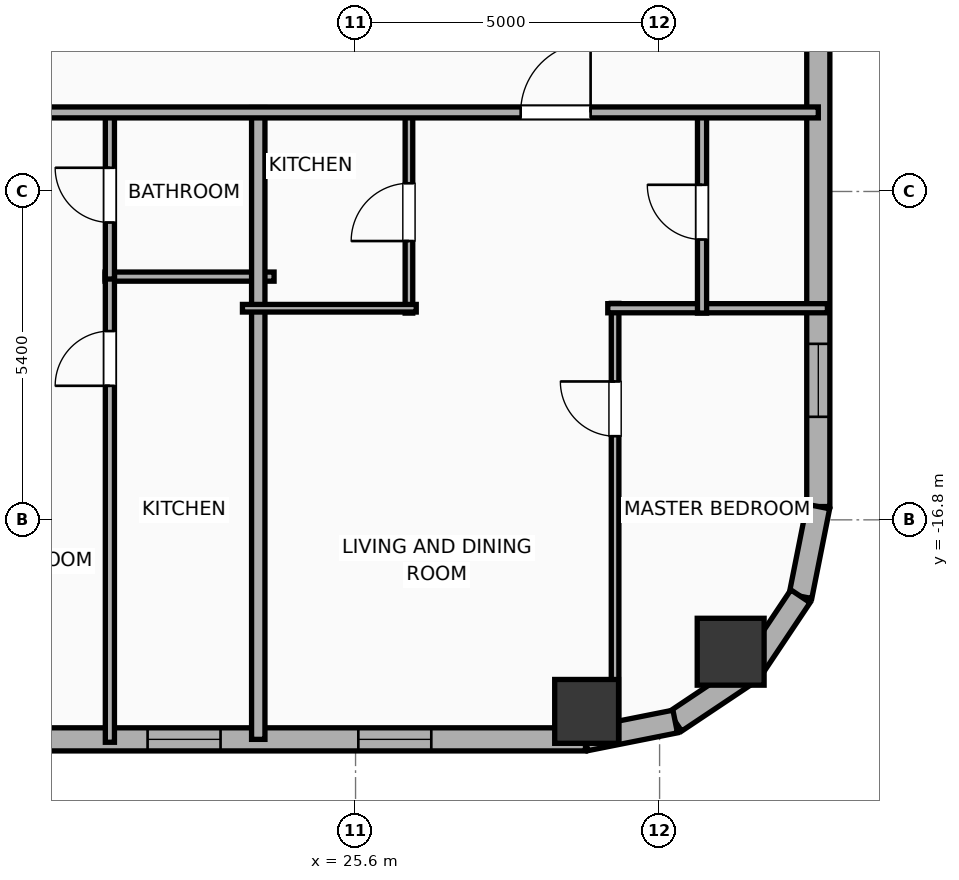
"""IFC4 building model, lengths in metres.
Left out: names, types, materials, properties, quantities, classifications, styles, units other than length and angle.
Written with IfcOpenShell. Run it as: python <this file> out.ifc"""

import sys

from ifc_helpers import new_model, si_unit, direction, frame, frame_2d, origin, origin_2d, place, context, subcontext, project, spatial, rectangle, hollow_rectangle, hollow_circle, extrude, element, fill, save


model = new_model("IFC4")
c1 = context("Model", 3, precision=1e-05, world=origin(), true_north=direction((0.0, 1.0)))
c2 = subcontext(c1, "Body", "Model", "MODEL_VIEW")
j1 = project(units=[si_unit("LENGTHUNIT", "METRE"), si_unit("PLANEANGLEUNIT", "RADIAN")], contexts=[c1])
p1 = place(None, origin())
s1 = spatial("IfcSite", under=j1, at=p1, CompositionType="ELEMENT")
p2 = place(p1, origin())
s2 = spatial("IfcBuilding", under=s1, at=p2, CompositionType="ELEMENT")
p3 = place(p2, frame((0.0, 0.0, 128.7)))
s3 = spatial("IfcBuildingStorey", under=s2, at=p3, CompositionType="ELEMENT", Elevation=128.7)
p4 = place(p3, frame((29.4, -19.95, 0.0), z_axis=(0.0, 0.0, 1.0), x_axis=(1.0, 0.0, 0.0)))
e1 = element("IfcColumn", 1, at=p4, inside=s3, PredefinedType="COLUMN", context=c2, shape_type="SweptSolid", body=[
    extrude(hollow_rectangle(XDim=1.05, YDim=1.05, WallThickness=0.036, at=origin_2d()), origin(), (0.0, 0.0, 1.0), 3.9),
])
p5 = place(p3, frame((31.769, -18.969, 0.0), z_axis=(0.0, 0.0, 1.0), x_axis=(1.0, 0.0, 0.0)))
e2 = element("IfcColumn", 2, at=p5, inside=s3, PredefinedType="COLUMN", context=c2, shape_type="SweptSolid", body=[
    extrude(hollow_circle(Radius=0.55, WallThickness=0.036, at=origin_2d()), origin(), (0.0, 0.0, 1.0), 3.9),
])
p6 = place(p3, frame((29.381, -20.41, 0.0), z_axis=(0.0, 0.0, 1.0), x_axis=(-1.0, 0.0, 0.0)))
e3 = element("IfcWall", 3, at=p6, inside=s3, PredefinedType="ELEMENTEDWALL", context=c2, shape_type="SweptSolid", body=[
    extrude(rectangle(XDim=54.763, YDim=0.38, at=frame_2d((27.381, 0.0))), origin(), (0.0, 0.0, 1.0), 3.65),
])
p7 = place(p6, frame((45.067, 0.0, 0.75)))
e4 = element("IfcOpeningElement", 4, at=p7, cuts=e3, PredefinedType="OPENING", context=c2, shape_type="SweptSolid", body=[
    extrude(rectangle(XDim=2.4, YDim=2.1, at=frame_2d((1.2, 1.05))), frame((0.0, 0.2, 0.0), z_axis=(0.0, -1.0, 0.0), x_axis=(1.0, 0.0, 0.0)), (0.0, 0.0, 1.0), 0.4),
])
p8 = place(p6, frame((51.777, 0.0, 0.75)))
e5 = element("IfcOpeningElement", 5, at=p8, cuts=e3, PredefinedType="OPENING", context=c2, shape_type="SweptSolid", body=[
    extrude(rectangle(XDim=1.2, YDim=2.05, at=frame_2d((0.6, 1.025))), frame((0.0, 0.2, 0.0), z_axis=(0.0, -1.0, 0.0), x_axis=(1.0, 0.0, 0.0)), (0.0, 0.0, 1.0), 0.4),
])
p9 = place(p6, frame((48.976, 0.0, 0.75)))
e6 = element("IfcOpeningElement", 6, at=p9, cuts=e3, PredefinedType="OPENING", context=c2, shape_type="SweptSolid", body=[
    extrude(rectangle(XDim=1.2, YDim=2.05, at=frame_2d((0.6, 1.025))), frame((0.0, 0.2, 0.0), z_axis=(0.0, -1.0, 0.0), x_axis=(1.0, 0.0, 0.0)), (0.0, 0.0, 1.0), 0.4),
])
p10 = place(p6, frame((40.531, 0.0, 0.75)))
e7 = element("IfcOpeningElement", 7, at=p10, cuts=e3, PredefinedType="OPENING", context=c2, shape_type="SweptSolid", body=[
    extrude(rectangle(XDim=1.2, YDim=2.05, at=frame_2d((0.6, 1.025))), frame((0.0, 0.2, 0.0), z_axis=(0.0, -1.0, 0.0), x_axis=(1.0, 0.0, 0.0)), (0.0, 0.0, 1.0), 0.4),
])
p11 = place(p6, frame((33.686, 0.0, 0.75)))
e8 = element("IfcOpeningElement", 8, at=p11, cuts=e3, PredefinedType="OPENING", context=c2, shape_type="SweptSolid", body=[
    extrude(rectangle(XDim=1.2, YDim=2.05, at=frame_2d((0.6, 1.025))), frame((0.0, 0.2, 0.0), z_axis=(0.0, -1.0, 0.0), x_axis=(1.0, 0.0, 0.0)), (0.0, 0.0, 1.0), 0.4),
])
p12 = place(p6, frame((35.976, 0.0, 0.75)))
e9 = element("IfcOpeningElement", 9, at=p12, cuts=e3, PredefinedType="OPENING", context=c2, shape_type="SweptSolid", body=[
    extrude(rectangle(XDim=1.2, YDim=2.05, at=frame_2d((0.6, 1.025))), frame((0.0, 0.2, 0.0), z_axis=(0.0, -1.0, 0.0), x_axis=(1.0, 0.0, 0.0)), (0.0, 0.0, 1.0), 0.4),
])
p13 = place(p6, frame((28.805, 0.0, 0.75)))
e10 = element("IfcOpeningElement", 10, at=p13, cuts=e3, PredefinedType="OPENING", context=c2, shape_type="SweptSolid", body=[
    extrude(rectangle(XDim=1.2, YDim=2.05, at=frame_2d((0.6, 1.025))), frame((0.0, 0.2, 0.0), z_axis=(0.0, -1.0, 0.0), x_axis=(1.0, 0.0, 0.0)), (0.0, 0.0, 1.0), 0.4),
])
p14 = place(p6, frame((25.555, 0.0, 0.75)))
e11 = element("IfcOpeningElement", 11, at=p14, cuts=e3, PredefinedType="OPENING", context=c2, shape_type="SweptSolid", body=[
    extrude(rectangle(XDim=1.2, YDim=2.05, at=frame_2d((0.6, 1.025))), frame((0.0, 0.2, 0.0), z_axis=(0.0, -1.0, 0.0), x_axis=(1.0, 0.0, 0.0)), (0.0, 0.0, 1.0), 0.4),
])
p15 = place(p6, frame((19.951, 0.0, 0.75)))
e12 = element("IfcOpeningElement", 12, at=p15, cuts=e3, PredefinedType="OPENING", context=c2, shape_type="SweptSolid", body=[
    extrude(rectangle(XDim=1.2, YDim=2.05, at=frame_2d((0.6, 1.025))), frame((0.0, 0.2, 0.0), z_axis=(0.0, -1.0, 0.0), x_axis=(1.0, 0.0, 0.0)), (0.0, 0.0, 1.0), 0.4),
])
p16 = place(p6, frame((15.836, 0.0, 0.75)))
e13 = element("IfcOpeningElement", 13, at=p16, cuts=e3, PredefinedType="OPENING", context=c2, shape_type="SweptSolid", body=[
    extrude(rectangle(XDim=1.2, YDim=2.05, at=frame_2d((0.6, 1.025))), frame((0.0, 0.2, 0.0), z_axis=(0.0, -1.0, 0.0), x_axis=(1.0, 0.0, 0.0)), (0.0, 0.0, 1.0), 0.4),
])
p17 = place(p6, frame((12.586, 0.0, 0.75)))
e14 = element("IfcOpeningElement", 14, at=p17, cuts=e3, PredefinedType="OPENING", context=c2, shape_type="SweptSolid", body=[
    extrude(rectangle(XDim=1.2, YDim=2.05, at=frame_2d((0.6, 1.025))), frame((0.0, 0.2, 0.0), z_axis=(0.0, -1.0, 0.0), x_axis=(1.0, 0.0, 0.0)), (0.0, 0.0, 1.0), 0.4),
])
p18 = place(p6, frame((9.011, 0.0, 0.75)))
e15 = element("IfcOpeningElement", 15, at=p18, cuts=e3, PredefinedType="OPENING", context=c2, shape_type="SweptSolid", body=[
    extrude(rectangle(XDim=1.2, YDim=2.05, at=frame_2d((0.6, 1.025))), frame((0.0, 0.2, 0.0), z_axis=(0.0, -1.0, 0.0), x_axis=(1.0, 0.0, 0.0)), (0.0, 0.0, 1.0), 0.4),
])
p19 = place(p6, frame((6.001, 0.0, 0.75)))
e16 = element("IfcOpeningElement", 16, at=p19, cuts=e3, PredefinedType="OPENING", context=c2, shape_type="SweptSolid", body=[
    extrude(rectangle(XDim=1.2, YDim=2.05, at=frame_2d((0.6, 1.025))), frame((0.0, 0.2, 0.0), z_axis=(0.0, -1.0, 0.0), x_axis=(1.0, 0.0, 0.0)), (0.0, 0.0, 1.0), 0.4),
])
p20 = place(p6, frame((2.536, 0.0, 0.75)))
e17 = element("IfcOpeningElement", 17, at=p20, cuts=e3, PredefinedType="OPENING", context=c2, shape_type="SweptSolid", body=[
    extrude(rectangle(XDim=1.2, YDim=2.05, at=frame_2d((0.6, 1.025))), frame((0.0, 0.2, 0.0), z_axis=(0.0, -1.0, 0.0), x_axis=(1.0, 0.0, 0.0)), (0.0, 0.0, 1.0), 0.4),
])
p21 = place(p3, frame((33.21, 17.781, 0.0), z_axis=(0.0, 0.0, 1.0), x_axis=(0.0, -1.0, 0.0)))
e18 = element("IfcWall", 18, at=p21, inside=s3, PredefinedType="ELEMENTEDWALL", context=c2, shape_type="SweptSolid", body=[
    extrude(rectangle(XDim=34.363, YDim=0.38, at=frame_2d((17.181, 0.0))), origin(), (0.0, 0.0, 1.0), 3.65),
])
p22 = place(p21, frame((31.687, 0.0, 0.75)))
e19 = element("IfcOpeningElement", 19, at=p22, cuts=e18, PredefinedType="OPENING", context=c2, shape_type="SweptSolid", body=[
    extrude(rectangle(XDim=1.2, YDim=2.05, at=frame_2d((0.6, 1.025))), frame((0.0, 0.2, 0.0), z_axis=(0.0, -1.0, 0.0), x_axis=(1.0, 0.0, 0.0)), (0.0, 0.0, 1.0), 0.4),
])
p23 = place(p21, frame((12.836, 0.0, 0.75)))
e20 = element("IfcOpeningElement", 20, at=p23, cuts=e18, PredefinedType="OPENING", context=c2, shape_type="SweptSolid", body=[
    extrude(rectangle(XDim=1.2, YDim=2.05, at=frame_2d((0.6, 1.025))), frame((0.0, 0.2, 0.0), z_axis=(0.0, -1.0, 0.0), x_axis=(1.0, 0.0, 0.0)), (0.0, 0.0, 1.0), 0.4),
])
p24 = place(p21, frame((21.386, 0.0, 0.75)))
e21 = element("IfcOpeningElement", 21, at=p24, cuts=e18, PredefinedType="OPENING", context=c2, shape_type="SweptSolid", body=[
    extrude(rectangle(XDim=1.2, YDim=2.05, at=frame_2d((0.6, 1.025))), frame((0.0, 0.2, 0.0), z_axis=(0.0, -1.0, 0.0), x_axis=(1.0, 0.0, 0.0)), (0.0, 0.0, 1.0), 0.4),
])
p25 = place(p3, frame((33.21, -16.581, 0.0), z_axis=(0.0, 0.0, 1.0), x_axis=(-0.195086038585, -0.980786132421, 0.0)))
e22 = element("IfcWall", 22, at=p25, inside=s3, PredefinedType="ELEMENTEDWALL", context=c2, shape_type="SweptSolid", body=[
    extrude(rectangle(XDim=1.504, YDim=0.38, at=frame_2d((0.752, 0.0))), origin(), (0.0, 0.0, 1.0), 3.65),
])
p26 = place(p3, frame((32.917, -18.057, 0.0), z_axis=(0.0, 0.0, 1.0), x_axis=(-0.555610286119, -0.831442848281, 0.0)))
e23 = element("IfcWall", 23, at=p26, inside=s3, PredefinedType="ELEMENTEDWALL", context=c2, shape_type="SweptSolid", body=[
    extrude(rectangle(XDim=1.485, YDim=0.38, at=frame_2d((0.743, 0.0))), origin(), (0.0, 0.0, 1.0), 3.65),
])
p27 = place(p3, frame((32.091, -19.292, 0.0), z_axis=(0.0, 0.0, 1.0), x_axis=(-0.831468045563, -0.555572577804, 0.0)))
e24 = element("IfcWall", 24, at=p27, inside=s3, PredefinedType="ELEMENTEDWALL", context=c2, shape_type="SweptSolid", body=[
    extrude(rectangle(XDim=1.485, YDim=0.38, at=frame_2d((0.742, 0.0))), origin(), (0.0, 0.0, 1.0), 3.65),
])
p28 = place(p3, frame((30.857, -20.116, 0.0), z_axis=(0.0, 0.0, 1.0), x_axis=(-0.980786132421, -0.195086038585, 0.0)))
e25 = element("IfcWall", 25, at=p28, inside=s3, PredefinedType="ELEMENTEDWALL", context=c2, shape_type="SweptSolid", body=[
    extrude(rectangle(XDim=1.504, YDim=0.38, at=frame_2d((0.752, 0.0))), origin(), (0.0, 0.0, 1.0), 3.65),
])
p29 = place(p3, frame((21.48, -12.8, 0.0), z_axis=(0.0, 0.0, 1.0), x_axis=(1.0, 0.0, 0.0)))
e26 = element("IfcWall", 26, at=p29, inside=s3, PredefinedType="PLUMBINGWALL", context=c2, shape_type="SweptSolid", body=[
    extrude(rectangle(XDim=2.78, YDim=0.15, at=frame_2d((1.39, 0.0))), origin(), (0.0, 0.0, 1.0), 3.65),
])
p30 = place(p3, frame((21.56, -20.458, 0.0), z_axis=(0.0, 0.0, 1.0), x_axis=(0.0, 1.0, 0.0)))
e27 = element("IfcWall", 27, at=p30, inside=s3, PredefinedType="PLUMBINGWALL", context=c2, shape_type="SweptSolid", body=[
    extrude(rectangle(XDim=7.698, YDim=0.15, at=frame_2d((3.849, 0.0))), origin(), (0.0, 0.0, 1.0), 3.65),
])
p31 = place(p30, frame((5.862, 0.0, 0.0)))
e28 = element("IfcOpeningElement", 28, at=p31, cuts=e27, PredefinedType="OPENING", context=c2, shape_type="SweptSolid", body=[
    extrude(rectangle(XDim=0.9, YDim=2.05, at=frame_2d((0.45, 1.025))), frame((0.0, 0.085, 0.0), z_axis=(0.0, -1.0, 0.0), x_axis=(1.0, 0.0, 0.0)), (0.0, 0.0, 1.0), 0.17),
])
p32 = place(p3, frame((21.56, -12.84, 0.0), z_axis=(0.0, 0.0, 1.0), x_axis=(0.0, 1.0, 0.0)))
e29 = element("IfcWall", 29, at=p32, inside=s3, PredefinedType="PLUMBINGWALL", context=c2, shape_type="SweptSolid", body=[
    extrude(rectangle(XDim=2.76, YDim=0.15, at=frame_2d((1.38, 0.0))), origin(), (0.0, 0.0, 1.0), 3.65),
])
p33 = place(p32, frame((0.93, 0.0, 0.0)))
e30 = element("IfcOpeningElement", 30, at=p33, cuts=e29, PredefinedType="OPENING", context=c2, shape_type="SweptSolid", body=[
    extrude(rectangle(XDim=0.9, YDim=2.05, at=frame_2d((0.45, 1.025))), frame((0.0, 0.085, 0.0), z_axis=(0.0, -1.0, 0.0), x_axis=(1.0, 0.0, 0.0)), (0.0, 0.0, 1.0), 0.17),
])
p34 = place(p3, frame((24.0, -20.41, 0.0), z_axis=(0.0, 0.0, 1.0), x_axis=(0.0, 1.0, 0.0)))
e31 = element("IfcWall", 31, at=p34, inside=s3, PredefinedType="PARTITIONING", context=c2, shape_type="SweptSolid", body=[
    extrude(rectangle(XDim=10.39, YDim=0.22, at=frame_2d((5.195, 0.0))), origin(), (0.0, 0.0, 1.0), 3.65),
])
p35 = place(p3, frame((29.868, -20.466, 0.0), z_axis=(0.0, 0.0, 1.0), x_axis=(0.0, 1.0, 0.0)))
e32 = element("IfcWall", 32, at=p35, inside=s3, PredefinedType="PARTITIONING", context=c2, shape_type="SweptSolid", body=[
    extrude(rectangle(XDim=7.226, YDim=0.125, at=frame_2d((3.613, 0.0))), origin(), (0.0, 0.0, 1.0), 3.65),
])
p36 = place(p35, frame((5.042, 0.0, 0.0)))
e33 = element("IfcOpeningElement", 33, at=p36, cuts=e32, PredefinedType="OPENING", context=c2, shape_type="SweptSolid", body=[
    extrude(rectangle(XDim=0.9, YDim=2.05, at=frame_2d((0.45, 1.025))), frame((0.0, 0.073, 0.0), z_axis=(0.0, -1.0, 0.0), x_axis=(1.0, 0.0, 0.0)), (0.0, 0.0, 1.0), 0.145),
])
p37 = place(p3, frame((29.748, -13.32, 0.0), z_axis=(0.0, 0.0, 1.0), x_axis=(1.0, 0.0, 0.0)))
e34 = element("IfcWall", 34, at=p37, inside=s3, PredefinedType="PLUMBINGWALL", context=c2, shape_type="SweptSolid", body=[
    extrude(rectangle(XDim=3.612, YDim=0.15, at=frame_2d((1.806, 0.0))), origin(), (0.0, 0.0, 1.0), 3.65),
])
p38 = place(p3, frame((26.478, -13.4, 0.0), z_axis=(0.0, 0.0, 1.0), x_axis=(0.0, 1.0, 0.0)))
e35 = element("IfcWall", 35, at=p38, inside=s3, PredefinedType="PARTITIONING", context=c2, shape_type="SweptSolid", body=[
    extrude(rectangle(XDim=3.32, YDim=0.125, at=frame_2d((1.66, 0.0))), origin(), (0.0, 0.0, 1.0), 3.65),
])
p39 = place(p38, frame((1.185, 0.0, 0.0)))
e36 = element("IfcOpeningElement", 36, at=p39, cuts=e35, PredefinedType="OPENING", context=c2, shape_type="SweptSolid", body=[
    extrude(rectangle(XDim=0.95, YDim=2.05, at=frame_2d((0.475, 1.025))), frame((0.0, 0.073, 0.0), z_axis=(0.0, -1.0, 0.0), x_axis=(1.0, 0.0, 0.0)), (0.0, 0.0, 1.0), 0.145),
])
p40 = place(p3, frame((23.74, -13.32, 0.0), z_axis=(0.0, 0.0, 1.0), x_axis=(1.0, 0.0, 0.0)))
e37 = element("IfcWall", 37, at=p40, inside=s3, PredefinedType="PARTITIONING", context=c2, shape_type="SweptSolid", body=[
    extrude(rectangle(XDim=2.858, YDim=0.125, at=frame_2d((1.429, 0.0))), origin(), (0.0, 0.0, 1.0), 3.65),
])
p41 = place(p3, frame((31.298, -13.4, 0.0), z_axis=(0.0, 0.0, 1.0), x_axis=(0.0, 1.0, 0.0)))
e38 = element("IfcWall", 38, at=p41, inside=s3, PredefinedType="PLUMBINGWALL", context=c2, shape_type="SweptSolid", body=[
    extrude(rectangle(XDim=3.32, YDim=0.15, at=frame_2d((1.66, 0.0))), origin(), (0.0, 0.0, 1.0), 3.65),
])
p42 = place(p41, frame((1.21, 0.0, 0.0)))
e39 = element("IfcOpeningElement", 39, at=p42, cuts=e38, PredefinedType="OPENING", context=c2, shape_type="SweptSolid", body=[
    extrude(rectangle(XDim=0.9, YDim=2.05, at=frame_2d((0.45, 1.025))), frame((0.0, 0.085, 0.0), z_axis=(0.0, -1.0, 0.0), x_axis=(1.0, 0.0, 0.0)), (0.0, 0.0, 1.0), 0.17),
])
p43 = place(p3, frame((-29.21, -10.1, 0.0), z_axis=(0.0, 0.0, 1.0), x_axis=(1.0, 0.0, 0.0)))
e40 = element("IfcWall", 40, at=p43, inside=s3, PredefinedType="PARTITIONING", context=c2, shape_type="SweptSolid", body=[
    extrude(rectangle(XDim=62.42, YDim=0.18, at=frame_2d((31.21, 0.0))), origin(), (0.0, 0.0, 1.0), 3.65),
])
p44 = place(p43, frame((3.414, 0.0, 0.0)))
e41 = element("IfcOpeningElement", 41, at=p44, cuts=e40, PredefinedType="OPENING", context=c2, shape_type="SweptSolid", body=[
    extrude(rectangle(XDim=1.15, YDim=2.05, at=frame_2d((0.575, 1.025))), frame((0.0, 0.1, 0.0), z_axis=(0.0, -1.0, 0.0), x_axis=(1.0, 0.0, 0.0)), (0.0, 0.0, 1.0), 0.2),
])
p45 = place(p43, frame((11.659, 0.0, 0.0)))
e42 = element("IfcOpeningElement", 42, at=p45, cuts=e40, PredefinedType="OPENING", context=c2, shape_type="SweptSolid", body=[
    extrude(rectangle(XDim=1.15, YDim=2.05, at=frame_2d((0.575, 1.025))), frame((0.0, 0.1, 0.0), z_axis=(0.0, -1.0, 0.0), x_axis=(1.0, 0.0, 0.0)), (0.0, 0.0, 1.0), 0.2),
])
p46 = place(p43, frame((17.14, 0.0, 0.0)))
e43 = element("IfcOpeningElement", 43, at=p46, cuts=e40, PredefinedType="OPENING", context=c2, shape_type="SweptSolid", body=[
    extrude(rectangle(XDim=0.9, YDim=2.05, at=frame_2d((0.45, 1.025))), frame((0.0, 0.1, 0.0), z_axis=(0.0, -1.0, 0.0), x_axis=(1.0, 0.0, 0.0)), (0.0, 0.0, 1.0), 0.2),
])
p47 = place(p43, frame((24.661, 0.0, 0.0)))
e44 = element("IfcOpeningElement", 44, at=p47, cuts=e40, PredefinedType="OPENING", context=c2, shape_type="SweptSolid", body=[
    extrude(rectangle(XDim=1.15, YDim=2.05, at=frame_2d((0.575, 1.025))), frame((0.0, 0.1, 0.0), z_axis=(0.0, -1.0, 0.0), x_axis=(1.0, 0.0, 0.0)), (0.0, 0.0, 1.0), 0.2),
])
p48 = place(p43, frame((28.644, 0.0, 0.0)))
e45 = element("IfcOpeningElement", 45, at=p48, cuts=e40, PredefinedType="OPENING", context=c2, shape_type="SweptSolid", body=[
    extrude(rectangle(XDim=1.15, YDim=2.05, at=frame_2d((0.575, 1.025))), frame((0.0, 0.1, 0.0), z_axis=(0.0, -1.0, 0.0), x_axis=(1.0, 0.0, 0.0)), (0.0, 0.0, 1.0), 0.2),
])
p49 = place(p43, frame((36.64, 0.0, 0.0)))
e46 = element("IfcOpeningElement", 46, at=p49, cuts=e40, PredefinedType="OPENING", context=c2, shape_type="SweptSolid", body=[
    extrude(rectangle(XDim=0.9, YDim=2.05, at=frame_2d((0.45, 1.025))), frame((0.0, 0.1, 0.0), z_axis=(0.0, -1.0, 0.0), x_axis=(1.0, 0.0, 0.0)), (0.0, 0.0, 1.0), 0.2),
])
p50 = place(p43, frame((41.608, 0.0, 0.0)))
e47 = element("IfcOpeningElement", 47, at=p50, cuts=e40, PredefinedType="OPENING", context=c2, shape_type="SweptSolid", body=[
    extrude(rectangle(XDim=1.15, YDim=2.05, at=frame_2d((0.575, 1.025))), frame((0.0, 0.1, 0.0), z_axis=(0.0, -1.0, 0.0), x_axis=(1.0, 0.0, 0.0)), (0.0, 0.0, 1.0), 0.2),
])
p51 = place(p43, frame((48.194, 0.0, 0.0)))
e48 = element("IfcOpeningElement", 48, at=p51, cuts=e40, PredefinedType="OPENING", context=c2, shape_type="SweptSolid", body=[
    extrude(rectangle(XDim=1.15, YDim=2.05, at=frame_2d((0.575, 1.025))), frame((0.0, 0.1, 0.0), z_axis=(0.0, -1.0, 0.0), x_axis=(1.0, 0.0, 0.0)), (0.0, 0.0, 1.0), 0.2),
])
p52 = place(p43, frame((57.525, 0.0, 0.0)))
e49 = element("IfcOpeningElement", 49, at=p52, cuts=e40, PredefinedType="OPENING", context=c2, shape_type="SweptSolid", body=[
    extrude(rectangle(XDim=1.15, YDim=2.05, at=frame_2d((0.575, 1.025))), frame((0.0, 0.1, 0.0), z_axis=(0.0, -1.0, 0.0), x_axis=(1.0, 0.0, 0.0)), (0.0, 0.0, 1.0), 0.2),
])
p53 = place(p19, origin())
e50 = element("IfcWindow", 50, at=p53, inside=s3, PartitioningType="SINGLE_PANEL", PredefinedType="WINDOW", context=c2, shape_type="SweptSolid", body=[
    extrude(rectangle(XDim=1.2, YDim=2.05, at=frame_2d((0.6, 1.025))), frame((0.0, 0.03, 0.0), z_axis=(0.0, -1.0, 0.0), x_axis=(1.0, 0.0, 0.0)), (0.0, 0.0, 1.0), 0.06),
])
fill(e16, e50)
p54 = place(p20, origin())
e51 = element("IfcWindow", 51, at=p54, inside=s3, PartitioningType="SINGLE_PANEL", PredefinedType="WINDOW", context=c2, shape_type="SweptSolid", body=[
    extrude(rectangle(XDim=1.2, YDim=2.05, at=frame_2d((0.6, 1.025))), frame((0.0, 0.03, 0.0), z_axis=(0.0, -1.0, 0.0), x_axis=(1.0, 0.0, 0.0)), (0.0, 0.0, 1.0), 0.06),
])
fill(e17, e51)
p55 = place(p22, origin())
e52 = element("IfcWindow", 52, at=p55, inside=s3, PartitioningType="SINGLE_PANEL", PredefinedType="WINDOW", context=c2, shape_type="SweptSolid", body=[
    extrude(rectangle(XDim=1.2, YDim=2.05, at=frame_2d((0.6, 1.025))), frame((0.0, 0.03, 0.0), z_axis=(0.0, -1.0, 0.0), x_axis=(1.0, 0.0, 0.0)), (0.0, 0.0, 1.0), 0.06),
])
fill(e19, e52)
p56 = place(p31, origin())
e53 = element("IfcDoor", 53, at=p56, inside=s3, OperationType="SINGLE_SWING_LEFT", PredefinedType="DOOR", context=c2, shape_type="SweptSolid", body=[
    extrude(rectangle(XDim=0.9, YDim=2.05, at=frame_2d((0.45, 1.025))), frame((0.0, 0.025, 0.0), z_axis=(0.0, -1.0, 0.0), x_axis=(1.0, 0.0, 0.0)), (0.0, 0.0, 1.0), 0.05),
])
fill(e28, e53)
p57 = place(p33, origin())
e54 = element("IfcDoor", 54, at=p57, inside=s3, OperationType="SINGLE_SWING_RIGHT", PredefinedType="DOOR", context=c2, shape_type="SweptSolid", body=[
    extrude(rectangle(XDim=0.9, YDim=2.05, at=frame_2d((0.45, 1.025))), frame((0.0, 0.025, 0.0), z_axis=(0.0, -1.0, 0.0), x_axis=(1.0, 0.0, 0.0)), (0.0, 0.0, 1.0), 0.05),
])
fill(e30, e54)
p58 = place(p36, origin())
e55 = element("IfcDoor", 55, at=p58, inside=s3, OperationType="SINGLE_SWING_RIGHT", PredefinedType="DOOR", context=c2, shape_type="SweptSolid", body=[
    extrude(rectangle(XDim=0.9, YDim=2.05, at=frame_2d((0.45, 1.025))), frame((0.0, 0.025, 0.0), z_axis=(0.0, -1.0, 0.0), x_axis=(1.0, 0.0, 0.0)), (0.0, 0.0, 1.0), 0.05),
])
fill(e33, e55)
p59 = place(p39, origin())
e56 = element("IfcDoor", 56, at=p59, inside=s3, OperationType="SINGLE_SWING_LEFT", PredefinedType="DOOR", context=c2, shape_type="SweptSolid", body=[
    extrude(rectangle(XDim=0.95, YDim=2.05, at=frame_2d((0.475, 1.025))), frame((0.0, 0.025, 0.0), z_axis=(0.0, -1.0, 0.0), x_axis=(1.0, 0.0, 0.0)), (0.0, 0.0, 1.0), 0.05),
])
fill(e36, e56)
p60 = place(p42, origin())
e57 = element("IfcDoor", 57, at=p60, inside=s3, OperationType="SINGLE_SWING_RIGHT", PredefinedType="DOOR", context=c2, shape_type="SweptSolid", body=[
    extrude(rectangle(XDim=0.9, YDim=2.05, at=frame_2d((0.45, 1.025))), frame((0.0, 0.025, 0.0), z_axis=(0.0, -1.0, 0.0), x_axis=(1.0, 0.0, 0.0)), (0.0, 0.0, 1.0), 0.05),
])
fill(e39, e57)
p61 = place(p52, origin())
e58 = element("IfcDoor", 58, at=p61, inside=s3, OperationType="SINGLE_SWING_RIGHT", PredefinedType="DOOR", context=c2, shape_type="SweptSolid", body=[
    extrude(rectangle(XDim=1.15, YDim=2.05, at=frame_2d((0.575, 1.025))), frame((0.0, 0.025, 0.0), z_axis=(0.0, -1.0, 0.0), x_axis=(1.0, 0.0, 0.0)), (0.0, 0.0, 1.0), 0.05),
])
fill(e49, e58)
save(model, sys.argv[1])
